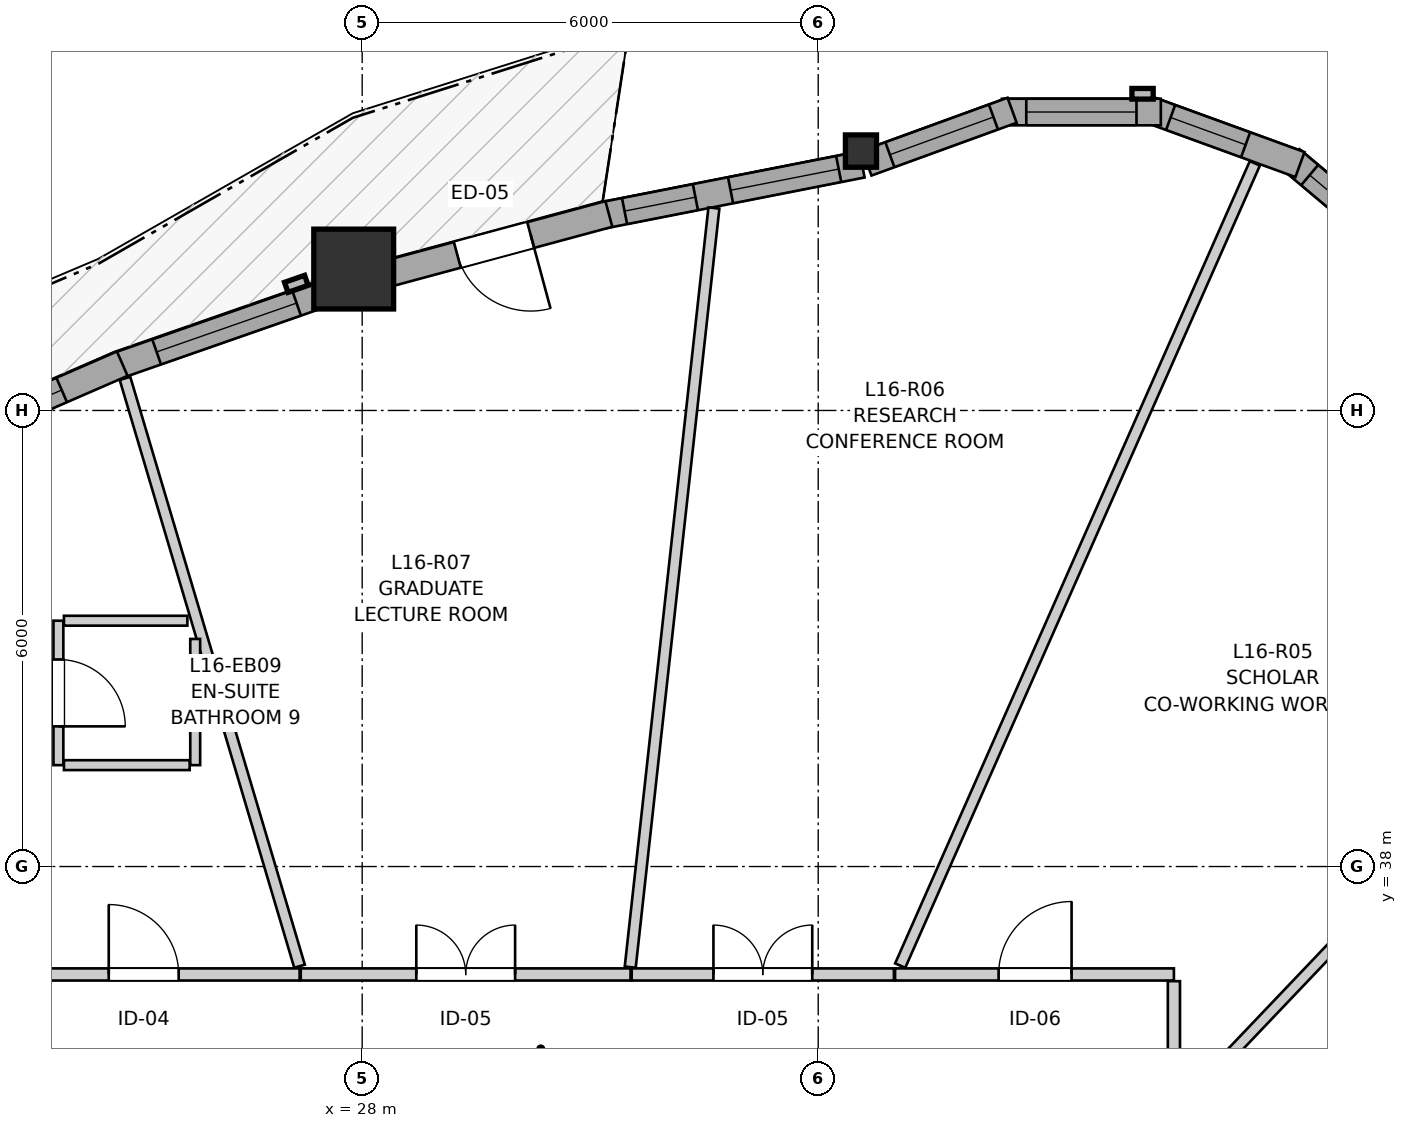
"""IFC4 building model, lengths in metres.
Left out: names, types, materials, properties, quantities, classifications, styles, units other than length and angle.
Written with IfcOpenShell. Run it as: python <this file> out.ifc"""

import sys

from ifc_helpers import new_model, si_unit, direction, frame, frame_2d, origin, origin_2d, place, context, subcontext, project, spatial, rectangle, i_section, extrude, source, transform, mapped, element, fill, save


model = new_model("IFC4")
c1 = context("Model", 3, precision=1e-05, world=origin(), true_north=direction((0.0, 1.0)))
c2 = subcontext(c1, "Body", "Model", "MODEL_VIEW")
j1 = project(units=[si_unit("LENGTHUNIT", "METRE"), si_unit("PLANEANGLEUNIT", "RADIAN")], contexts=[c1])
p1 = place(None, origin())
s1 = spatial("IfcSite", under=j1, at=p1, CompositionType="ELEMENT")
p2 = place(p1, origin())
s2 = spatial("IfcBuilding", under=s1, at=p2, CompositionType="ELEMENT")
p3 = place(p2, frame((0.0, 0.0, 55.8)))
s3 = spatial("IfcBuildingStorey", under=s2, at=p3, CompositionType="ELEMENT", Elevation=55.8)
m1 = source(origin(), c2, "Body", "SweptSolid", [
    extrude(i_section(OverallWidth=0.409, OverallDepth=0.425, WebThickness=0.03, FlangeThickness=0.048, FilletRadius=0.015, at=origin_2d()), origin(), (0.0, 0.0, 1.0), 2.94),
])
p4 = place(p3, frame((34.562, 47.413, 0.0), z_axis=(0.0, 0.0, 1.0), x_axis=(1.0, 0.0, 0.0)))
e1 = element("IfcColumn", 1, at=p4, inside=s3, PredefinedType="PILASTER", context=c2, shape_type="MappedRepresentation", body=[
    mapped(m1, transform((0.0, 0.0, 0.0), x_axis=(1.0, 0.0, 0.0), y_axis=(0.0, 1.0, 0.0), z_axis=(0.0, 0.0, 1.0), scale=1.0)),
])
m2 = source(origin(), c2, "Body", "SweptSolid", [
    extrude(rectangle(XDim=1.05, YDim=1.05, at=origin_2d()), origin(), (0.0, 0.0, 1.0), 2.94),
])
p5 = place(p3, frame((27.888, 45.861, 0.0), z_axis=(0.0, 0.0, 1.0), x_axis=(1.0, 0.0, 0.0)))
e2 = element("IfcColumn", 2, at=p5, inside=s3, PredefinedType="COLUMN", context=c2, shape_type="MappedRepresentation", body=[
    mapped(m2, transform((0.0, 0.0, 0.0), x_axis=(1.0, 0.0, 0.0), y_axis=(0.0, 1.0, 0.0), z_axis=(0.0, 0.0, 1.0), scale=1.0)),
])
p6 = place(p3, frame((41.822, 45.959, 0.0), z_axis=(0.0, 0.0, 1.0), x_axis=(-0.766024572719, 0.642811289563, 0.0)))
e3 = element("IfcWall", 3, at=p6, inside=s3, PredefinedType="SOLIDWALL", context=c2, shape_type="SweptSolid", body=[
    extrude(rectangle(XDim=2.09, YDim=0.35, at=frame_2d((1.045, 0.0))), origin(), (0.0, 0.0, 1.0), 2.42),
])
p7 = place(p6, frame((0.32, 0.0, 0.82)))
e4 = element("IfcOpeningElement", 4, at=p7, cuts=e3, PredefinedType="OPENING", context=c2, shape_type="SweptSolid", body=[
    extrude(rectangle(XDim=1.45, YDim=1.25, at=frame_2d((0.725, 0.625))), frame((0.0, 0.185, 0.0), z_axis=(0.0, -1.0, 0.0), x_axis=(1.0, 0.0, 0.0)), (0.0, 0.0, 1.0), 0.37),
])
p8 = place(p3, frame((40.338, 47.235, 0.0), z_axis=(0.0, 0.0, 1.0), x_axis=(-0.939711556618, 0.341968113072, 0.0)))
e5 = element("IfcWall", 5, at=p8, inside=s3, PredefinedType="SOLIDWALL", context=c2, shape_type="SweptSolid", body=[
    extrude(rectangle(XDim=2.09, YDim=0.35, at=frame_2d((1.045, 0.0))), origin(), (0.0, 0.0, 1.0), 2.42),
])
p9 = place(p8, frame((0.761, 0.0, 0.82)))
e6 = element("IfcOpeningElement", 6, at=p9, cuts=e5, PredefinedType="OPENING", context=c2, shape_type="SweptSolid", body=[
    extrude(rectangle(XDim=1.05, YDim=1.45, at=frame_2d((0.525, 0.725))), frame((0.0, 0.185, 0.0), z_axis=(0.0, -1.0, 0.0), x_axis=(1.0, 0.0, 0.0)), (0.0, 0.0, 1.0), 0.37),
])
p10 = place(p3, frame((38.508, 47.927, 0.0), z_axis=(0.0, 0.0, 1.0), x_axis=(-1.0, 0.0, 0.0)))
e7 = element("IfcWall", 7, at=p10, inside=s3, PredefinedType="SOLIDWALL", context=c2, shape_type="SweptSolid", body=[
    extrude(rectangle(XDim=2.091, YDim=0.35, at=frame_2d((1.045, 0.0))), origin(), (0.0, 0.0, 1.0), 2.42),
])
p11 = place(p10, frame((0.32, 0.0, 0.82)))
e8 = element("IfcOpeningElement", 8, at=p11, cuts=e7, PredefinedType="OPENING", context=c2, shape_type="SweptSolid", body=[
    extrude(rectangle(XDim=1.45, YDim=1.25, at=frame_2d((0.725, 0.625))), frame((0.0, 0.185, 0.0), z_axis=(0.0, -1.0, 0.0), x_axis=(1.0, 0.0, 0.0)), (0.0, 0.0, 1.0), 0.37),
])
p12 = place(p3, frame((36.551, 47.95, 0.0), z_axis=(0.0, 0.0, 1.0), x_axis=(-0.939691662178, -0.342022777067, 0.0)))
e9 = element("IfcWall", 9, at=p12, inside=s3, PredefinedType="SOLIDWALL", context=c2, shape_type="SweptSolid", body=[
    extrude(rectangle(XDim=2.032, YDim=0.35, at=frame_2d((1.016, 0.0))), origin(), (0.0, 0.0, 1.0), 2.42),
])
p13 = place(p12, frame((0.261, 0.0, 0.82)))
e10 = element("IfcOpeningElement", 10, at=p13, cuts=e9, PredefinedType="OPENING", context=c2, shape_type="SweptSolid", body=[
    extrude(rectangle(XDim=1.45, YDim=1.25, at=frame_2d((0.725, 0.625))), frame((0.0, 0.185, 0.0), z_axis=(0.0, -1.0, 0.0), x_axis=(1.0, 0.0, 0.0)), (0.0, 0.0, 1.0), 0.37),
])
p14 = place(p3, frame((34.577, 47.237, 0.0), z_axis=(0.0, 0.0, 1.0), x_axis=(-0.981238400755, -0.192798342532, 0.0)))
e11 = element("IfcWall", 11, at=p14, inside=s3, PredefinedType="SOLIDWALL", context=c2, shape_type="SweptSolid", body=[
    extrude(rectangle(XDim=3.482, YDim=0.35, at=frame_2d((1.741, 0.0))), origin(), (0.0, 0.0, 1.0), 2.42),
])
p15 = place(p14, frame((0.313, 0.0, 0.82)))
e12 = element("IfcOpeningElement", 12, at=p15, cuts=e11, PredefinedType="OPENING", context=c2, shape_type="SweptSolid", body=[
    extrude(rectangle(XDim=1.45, YDim=1.25, at=frame_2d((0.725, 0.625))), frame((0.0, 0.185, 0.0), z_axis=(0.0, -1.0, 0.0), x_axis=(1.0, 0.0, 0.0)), (0.0, 0.0, 1.0), 0.37),
])
p16 = place(p14, frame((2.234, 0.0, 0.82)))
e13 = element("IfcOpeningElement", 13, at=p16, cuts=e11, PredefinedType="OPENING", context=c2, shape_type="SweptSolid", body=[
    extrude(rectangle(XDim=0.95, YDim=1.35, at=frame_2d((0.475, 0.675))), frame((0.0, 0.185, 0.0), z_axis=(0.0, -1.0, 0.0), x_axis=(1.0, 0.0, 0.0)), (0.0, 0.0, 1.0), 0.37),
])
p17 = place(p3, frame((31.246, 46.585, 0.0), z_axis=(0.0, 0.0, 1.0), x_axis=(-0.965469506164, -0.260516089076, 0.0)))
e14 = element("IfcWall", 14, at=p17, inside=s3, PredefinedType="SOLIDWALL", context=c2, shape_type="SweptSolid", body=[
    extrude(rectangle(XDim=3.13, YDim=0.35, at=frame_2d((1.565, 0.0))), origin(), (0.0, 0.0, 1.0), 2.42),
])
p18 = place(p17, frame((1.065, 0.0, 0.0)))
e15 = element("IfcOpeningElement", 15, at=p18, cuts=e14, PredefinedType="OPENING", context=c2, shape_type="SweptSolid", body=[
    extrude(rectangle(XDim=1.0, YDim=2.1, at=frame_2d((0.5, 1.05))), frame((0.0, 0.185, 0.0), z_axis=(0.0, -1.0, 0.0), x_axis=(1.0, 0.0, 0.0)), (0.0, 0.0, 1.0), 0.37),
])
p19 = place(p3, frame((27.663, 45.596, 0.0), z_axis=(0.0, 0.0, 1.0), x_axis=(-0.944134113087, -0.329561491236, 0.0)))
e16 = element("IfcWall", 16, at=p19, inside=s3, PredefinedType="SOLIDWALL", context=c2, shape_type="SweptSolid", body=[
    extrude(rectangle(XDim=3.074, YDim=0.35, at=frame_2d((1.537, 0.0))), origin(), (0.0, 0.0, 1.0), 2.42),
])
p20 = place(p19, frame((0.557, 0.0, 0.82)))
e17 = element("IfcOpeningElement", 17, at=p20, cuts=e16, PredefinedType="OPENING", context=c2, shape_type="SweptSolid", body=[
    extrude(rectangle(XDim=1.95, YDim=1.4, at=frame_2d((0.975, 0.7))), frame((0.0, 0.185, 0.0), z_axis=(0.0, -1.0, 0.0), x_axis=(1.0, 0.0, 0.0)), (0.0, 0.0, 1.0), 0.37),
])
p21 = place(p3, frame((24.843, 44.615, 0.0), z_axis=(0.0, 0.0, 1.0), x_axis=(-0.917119193404, -0.398613076918, 0.0)))
e18 = element("IfcWall", 18, at=p21, inside=s3, PredefinedType="SOLIDWALL", context=c2, shape_type="SweptSolid", body=[
    extrude(rectangle(XDim=3.317, YDim=0.35, at=frame_2d((1.659, 0.0))), origin(), (0.0, 0.0, 1.0), 2.42),
])
p22 = place(p21, frame((0.869, 0.0, 0.82)))
e19 = element("IfcOpeningElement", 19, at=p22, cuts=e18, PredefinedType="OPENING", context=c2, shape_type="SweptSolid", body=[
    extrude(rectangle(XDim=1.6, YDim=1.35, at=frame_2d((0.8, 0.675))), frame((0.0, 0.185, 0.0), z_axis=(0.0, -1.0, 0.0), x_axis=(1.0, 0.0, 0.0)), (0.0, 0.0, 1.0), 0.37),
])
p23 = place(p3, frame((27.192, 36.58, 0.0), z_axis=(0.0, 0.0, 1.0), x_axis=(1.0, 0.0, 0.0)))
e20 = element("IfcWall", 20, at=p23, inside=s3, PredefinedType="PARTITIONING", context=c2, shape_type="SweptSolid", body=[
    extrude(rectangle(XDim=4.339, YDim=0.16, at=frame_2d((2.169, 0.0))), origin(), (0.0, 0.0, 1.0), 2.94),
])
p24 = place(p23, frame((1.52, 0.0, 0.0)))
e21 = element("IfcOpeningElement", 21, at=p24, cuts=e20, PredefinedType="OPENING", context=c2, shape_type="SweptSolid", body=[
    extrude(rectangle(XDim=1.3, YDim=2.1, at=frame_2d((0.65, 1.05))), frame((0.0, 0.09, 0.0), z_axis=(0.0, -1.0, 0.0), x_axis=(1.0, 0.0, 0.0)), (0.0, 0.0, 1.0), 0.18),
])
p25 = place(p3, frame((23.025, 36.58, 0.0), z_axis=(0.0, 0.0, 1.0), x_axis=(1.0, 0.0, 0.0)))
e22 = element("IfcWall", 22, at=p25, inside=s3, PredefinedType="PARTITIONING", context=c2, shape_type="SweptSolid", body=[
    extrude(rectangle(XDim=4.152, YDim=0.16, at=frame_2d((2.076, 0.0))), origin(), (0.0, 0.0, 1.0), 2.548),
])
p26 = place(p25, frame((1.64, 0.0, 0.0)))
e23 = element("IfcOpeningElement", 23, at=p26, cuts=e22, PredefinedType="OPENING", context=c2, shape_type="SweptSolid", body=[
    extrude(rectangle(XDim=0.92, YDim=2.1, at=frame_2d((0.46, 1.05))), frame((0.0, 0.09, 0.0), z_axis=(0.0, -1.0, 0.0), x_axis=(1.0, 0.0, 0.0)), (0.0, 0.0, 1.0), 0.18),
])
p27 = place(p3, frame((35.011, 36.58, 0.0), z_axis=(0.0, 0.0, 1.0), x_axis=(1.0, 0.0, 0.0)))
e24 = element("IfcWall", 24, at=p27, inside=s3, PredefinedType="PARTITIONING", context=c2, shape_type="SweptSolid", body=[
    extrude(rectangle(XDim=3.669, YDim=0.16, at=frame_2d((1.834, 0.0))), origin(), (0.0, 0.0, 1.0), 2.94),
])
p28 = place(p27, frame((1.363, 0.0, 0.0)))
e25 = element("IfcOpeningElement", 25, at=p28, cuts=e24, PredefinedType="OPENING", context=c2, shape_type="SweptSolid", body=[
    extrude(rectangle(XDim=0.96, YDim=2.1, at=frame_2d((0.48, 1.05))), frame((0.0, 0.09, 0.0), z_axis=(0.0, -1.0, 0.0), x_axis=(1.0, 0.0, 0.0)), (0.0, 0.0, 1.0), 0.18),
])
p29 = place(p3, frame((31.546, 36.58, 0.0), z_axis=(0.0, 0.0, 1.0), x_axis=(1.0, 0.0, 0.0)))
e26 = element("IfcWall", 26, at=p29, inside=s3, PredefinedType="PARTITIONING", context=c2, shape_type="SweptSolid", body=[
    extrude(rectangle(XDim=3.45, YDim=0.16, at=frame_2d((1.725, 0.0))), origin(), (0.0, 0.0, 1.0), 2.94),
])
p30 = place(p29, frame((1.075, 0.0, 0.0)))
e27 = element("IfcOpeningElement", 27, at=p30, cuts=e26, PredefinedType="OPENING", context=c2, shape_type="SweptSolid", body=[
    extrude(rectangle(XDim=1.3, YDim=2.1, at=frame_2d((0.65, 1.05))), frame((0.0, 0.09, 0.0), z_axis=(0.0, -1.0, 0.0), x_axis=(1.0, 0.0, 0.0)), (0.0, 0.0, 1.0), 0.18),
])
p31 = place(p3, frame((24.003, 41.234, 0.0), z_axis=(0.0, 0.0, 1.0), x_axis=(0.0, -1.0, 0.0)))
e28 = element("IfcWall", 28, at=p31, inside=s3, PredefinedType="PARTITIONING", context=c2, shape_type="SweptSolid", body=[
    extrude(rectangle(XDim=1.9, YDim=0.13, at=frame_2d((0.95, 0.0))), origin(), (0.0, 0.0, 1.0), 2.94),
])
p32 = place(p31, frame((0.51, 0.0, 0.0)))
e29 = element("IfcOpeningElement", 29, at=p32, cuts=e28, PredefinedType="OPENING", context=c2, shape_type="SweptSolid", body=[
    extrude(rectangle(XDim=0.88, YDim=2.05, at=frame_2d((0.44, 1.025))), frame((0.0, 0.075, 0.0), z_axis=(0.0, -1.0, 0.0), x_axis=(1.0, 0.0, 0.0)), (0.0, 0.0, 1.0), 0.15),
])
p33 = place(p3, frame((35.079, 36.697, 0.0), z_axis=(0.0, 0.0, 1.0), x_axis=(0.404349483928, 0.914604556542, 0.0)))
e30 = element("IfcWall", 30, at=p33, inside=s3, PredefinedType="PARTITIONING", context=c2, shape_type="SweptSolid", body=[
    extrude(rectangle(XDim=11.54, YDim=0.145, at=frame_2d((5.77, 0.0))), origin(), (0.0, 0.0, 1.0), 2.94),
])
p34 = place(p3, frame((31.527, 36.676, 0.0), z_axis=(0.0, 0.0, 1.0), x_axis=(0.109575491405, 0.993978476469, 0.0)))
e31 = element("IfcWall", 31, at=p34, inside=s3, PredefinedType="PARTITIONING", context=c2, shape_type="SweptSolid", body=[
    extrude(rectangle(XDim=10.049, YDim=0.145, at=frame_2d((5.024, 0.0))), origin(), (0.0, 0.0, 1.0), 2.94),
])
p35 = place(p3, frame((24.879, 44.422, 0.0), z_axis=(0.0, 0.0, 1.0), x_axis=(0.284634354208, -0.958636158511, 0.0)))
e32 = element("IfcWall", 32, at=p35, inside=s3, PredefinedType="PARTITIONING", context=c2, shape_type="SweptSolid", body=[
    extrude(rectangle(XDim=8.068, YDim=0.145, at=frame_2d((4.034, 0.0))), origin(), (0.0, 0.0, 1.0), 2.94),
])
p36 = place(p3, frame((38.818, 34.893, 0.0), z_axis=(0.0, 0.0, 1.0), x_axis=(0.68961378572, 0.724177344678, 0.0)))
e33 = element("IfcWall", 33, at=p36, inside=s3, PredefinedType="PARTITIONING", context=c2, shape_type="SweptSolid", body=[
    extrude(rectangle(XDim=7.071, YDim=0.145, at=frame_2d((3.535, 0.0))), origin(), (0.0, 0.0, 1.0), 2.94),
])
p37 = place(p3, frame((25.803, 39.334, 0.0), z_axis=(0.0, 0.0, 1.0), x_axis=(0.0, 1.0, 0.0)))
e34 = element("IfcWall", 34, at=p37, inside=s3, PredefinedType="PARTITIONING", context=c2, shape_type="SweptSolid", body=[
    extrude(rectangle(XDim=1.66, YDim=0.13, at=frame_2d((0.83, 0.0))), origin(), (0.0, 0.0, 1.0), 2.94),
])
p38 = place(p3, frame((24.076, 41.234, 0.0), z_axis=(0.0, 0.0, 1.0), x_axis=(1.0, 0.0, 0.0)))
e35 = element("IfcWall", 35, at=p38, inside=s3, PredefinedType="PARTITIONING", context=c2, shape_type="SweptSolid", body=[
    extrude(rectangle(XDim=1.624, YDim=0.13, at=frame_2d((0.812, 0.0))), origin(), (0.0, 0.0, 1.0), 2.94),
])
p39 = place(p3, frame((24.076, 39.334, 0.0), z_axis=(0.0, 0.0, 1.0), x_axis=(1.0, 0.0, 0.0)))
e36 = element("IfcWall", 36, at=p39, inside=s3, PredefinedType="PARTITIONING", context=c2, shape_type="SweptSolid", body=[
    extrude(rectangle(XDim=1.654, YDim=0.13, at=frame_2d((0.827, 0.0))), origin(), (0.0, 0.0, 1.0), 2.94),
])
p40 = place(p3, frame((38.68, 34.981, 0.0), z_axis=(0.0, 0.0, 1.0), x_axis=(0.0, 1.0, 0.0)))
e37 = element("IfcWall", 37, at=p40, inside=s3, PredefinedType="PARTITIONING", context=c2, shape_type="SweptSolid", body=[
    extrude(rectangle(XDim=1.511, YDim=0.16, at=frame_2d((0.755, 0.0))), origin(), (0.0, 0.0, 1.0), 2.94),
])
m3 = source(origin(), c2, "Body", "SweptSolid", [
    extrude(rectangle(XDim=1.45, YDim=1.25, at=frame_2d((0.725, 0.625))), frame((0.0, 0.03, 0.0), z_axis=(0.0, -1.0, 0.0), x_axis=(1.0, 0.0, 0.0)), (0.0, 0.0, 1.0), 0.06),
])
p41 = place(p7, origin())
e38 = element("IfcWindow", 38, at=p41, inside=s3, PartitioningType="SINGLE_PANEL", PredefinedType="WINDOW", context=c2, shape_type="MappedRepresentation", body=[
    mapped(m3, transform((0.0, 0.0, 0.0), x_axis=(1.0, 0.0, 0.0), y_axis=(0.0, 1.0, 0.0), z_axis=(0.0, 0.0, 1.0), scale=1.0)),
])
fill(e4, e38)
m4 = source(origin(), c2, "Body", "SweptSolid", [
    extrude(rectangle(XDim=1.05, YDim=1.45, at=frame_2d((0.525, 0.725))), frame((0.0, 0.03, 0.0), z_axis=(0.0, -1.0, 0.0), x_axis=(1.0, 0.0, 0.0)), (0.0, 0.0, 1.0), 0.06),
])
p42 = place(p9, origin())
e39 = element("IfcWindow", 39, at=p42, inside=s3, PartitioningType="SINGLE_PANEL", PredefinedType="WINDOW", context=c2, shape_type="MappedRepresentation", body=[
    mapped(m4, transform((0.0, 0.0, 0.0), x_axis=(1.0, 0.0, 0.0), y_axis=(0.0, 1.0, 0.0), z_axis=(0.0, 0.0, 1.0), scale=1.0)),
])
fill(e6, e39)
p43 = place(p11, origin())
e40 = element("IfcWindow", 40, at=p43, inside=s3, PartitioningType="SINGLE_PANEL", PredefinedType="WINDOW", context=c2, shape_type="MappedRepresentation", body=[
    mapped(m3, transform((0.0, 0.0, 0.0), x_axis=(1.0, 0.0, 0.0), y_axis=(0.0, 1.0, 0.0), z_axis=(0.0, 0.0, 1.0), scale=1.0)),
])
fill(e8, e40)
p44 = place(p13, origin())
e41 = element("IfcWindow", 41, at=p44, inside=s3, PartitioningType="SINGLE_PANEL", PredefinedType="WINDOW", context=c2, shape_type="MappedRepresentation", body=[
    mapped(m3, transform((0.0, 0.0, 0.0), x_axis=(1.0, 0.0, 0.0), y_axis=(0.0, 1.0, 0.0), z_axis=(0.0, 0.0, 1.0), scale=1.0)),
])
fill(e10, e41)
p45 = place(p15, origin())
e42 = element("IfcWindow", 42, at=p45, inside=s3, PartitioningType="SINGLE_PANEL", PredefinedType="WINDOW", context=c2, shape_type="MappedRepresentation", body=[
    mapped(m3, transform((0.0, 0.0, 0.0), x_axis=(1.0, 0.0, 0.0), y_axis=(0.0, 1.0, 0.0), z_axis=(0.0, 0.0, 1.0), scale=1.0)),
])
fill(e12, e42)
m5 = source(origin(), c2, "Body", "SweptSolid", [
    extrude(rectangle(XDim=0.95, YDim=1.35, at=frame_2d((0.475, 0.675))), frame((0.0, 0.03, 0.0), z_axis=(0.0, -1.0, 0.0), x_axis=(1.0, 0.0, 0.0)), (0.0, 0.0, 1.0), 0.06),
])
p46 = place(p16, origin())
e43 = element("IfcWindow", 43, at=p46, inside=s3, PartitioningType="SINGLE_PANEL", PredefinedType="WINDOW", context=c2, shape_type="MappedRepresentation", body=[
    mapped(m5, transform((0.0, 0.0, 0.0), x_axis=(1.0, 0.0, 0.0), y_axis=(0.0, 1.0, 0.0), z_axis=(0.0, 0.0, 1.0), scale=1.0)),
])
fill(e13, e43)
m6 = source(origin(), c2, "Body", "SweptSolid", [
    extrude(rectangle(XDim=1.95, YDim=1.4, at=frame_2d((0.975, 0.7))), frame((0.0, 0.03, 0.0), z_axis=(0.0, -1.0, 0.0), x_axis=(1.0, 0.0, 0.0)), (0.0, 0.0, 1.0), 0.06),
])
p47 = place(p20, origin())
e44 = element("IfcWindow", 44, at=p47, inside=s3, PartitioningType="SINGLE_PANEL", PredefinedType="WINDOW", context=c2, shape_type="MappedRepresentation", body=[
    mapped(m6, transform((0.0, 0.0, 0.0), x_axis=(1.0, 0.0, 0.0), y_axis=(0.0, 1.0, 0.0), z_axis=(0.0, 0.0, 1.0), scale=1.0)),
])
fill(e17, e44)
m7 = source(origin(), c2, "Body", "SweptSolid", [
    extrude(rectangle(XDim=1.6, YDim=1.35, at=frame_2d((0.8, 0.675))), frame((0.0, 0.03, 0.0), z_axis=(0.0, -1.0, 0.0), x_axis=(1.0, 0.0, 0.0)), (0.0, 0.0, 1.0), 0.06),
])
p48 = place(p22, origin())
e45 = element("IfcWindow", 45, at=p48, inside=s3, PartitioningType="SINGLE_PANEL", PredefinedType="WINDOW", context=c2, shape_type="MappedRepresentation", body=[
    mapped(m7, transform((0.0, 0.0, 0.0), x_axis=(1.0, 0.0, 0.0), y_axis=(0.0, 1.0, 0.0), z_axis=(0.0, 0.0, 1.0), scale=1.0)),
])
fill(e19, e45)
m8 = source(origin(), c2, "Body", "SweptSolid", [
    extrude(rectangle(XDim=1.0, YDim=2.1, at=frame_2d((0.5, 1.05))), frame((0.0, 0.025, 0.0), z_axis=(0.0, -1.0, 0.0), x_axis=(1.0, 0.0, 0.0)), (0.0, 0.0, 1.0), 0.05),
])
p49 = place(p18, origin())
e46 = element("IfcDoor", 46, at=p49, inside=s3, OperationType="SINGLE_SWING_LEFT", PredefinedType="DOOR", context=c2, shape_type="MappedRepresentation", body=[
    mapped(m8, transform((0.0, 0.0, 0.0), x_axis=(1.0, 0.0, 0.0), y_axis=(0.0, 1.0, 0.0), z_axis=(0.0, 0.0, 1.0), scale=1.0)),
])
fill(e15, e46)
m9 = source(origin(), c2, "Body", "SweptSolid", [
    extrude(rectangle(XDim=1.3, YDim=2.1, at=frame_2d((0.65, 1.05))), frame((0.0, 0.025, 0.0), z_axis=(0.0, -1.0, 0.0), x_axis=(1.0, 0.0, 0.0)), (0.0, 0.0, 1.0), 0.05),
])
p50 = place(p24, origin())
e47 = element("IfcDoor", 47, at=p50, inside=s3, OperationType="DOUBLE_DOOR_SINGLE_SWING", PredefinedType="DOOR", context=c2, shape_type="MappedRepresentation", body=[
    mapped(m9, transform((0.0, 0.0, 0.0), x_axis=(1.0, 0.0, 0.0), y_axis=(0.0, 1.0, 0.0), z_axis=(0.0, 0.0, 1.0), scale=1.0)),
])
fill(e21, e47)
m10 = source(origin(), c2, "Body", "SweptSolid", [
    extrude(rectangle(XDim=0.92, YDim=2.1, at=frame_2d((0.46, 1.05))), frame((0.0, 0.025, 0.0), z_axis=(0.0, -1.0, 0.0), x_axis=(1.0, 0.0, 0.0)), (0.0, 0.0, 1.0), 0.05),
])
p51 = place(p26, origin())
e48 = element("IfcDoor", 48, at=p51, inside=s3, OperationType="SINGLE_SWING_LEFT", PredefinedType="DOOR", context=c2, shape_type="MappedRepresentation", body=[
    mapped(m10, transform((0.0, 0.0, 0.0), x_axis=(1.0, 0.0, 0.0), y_axis=(0.0, 1.0, 0.0), z_axis=(0.0, 0.0, 1.0), scale=1.0)),
])
fill(e23, e48)
m11 = source(origin(), c2, "Body", "SweptSolid", [
    extrude(rectangle(XDim=0.96, YDim=2.1, at=frame_2d((0.48, 1.05))), frame((0.0, 0.025, 0.0), z_axis=(0.0, -1.0, 0.0), x_axis=(1.0, 0.0, 0.0)), (0.0, 0.0, 1.0), 0.05),
])
p52 = place(p28, origin())
e49 = element("IfcDoor", 49, at=p52, inside=s3, OperationType="SINGLE_SWING_RIGHT", PredefinedType="DOOR", context=c2, shape_type="MappedRepresentation", body=[
    mapped(m11, transform((0.0, 0.0, 0.0), x_axis=(1.0, 0.0, 0.0), y_axis=(0.0, 1.0, 0.0), z_axis=(0.0, 0.0, 1.0), scale=1.0)),
])
fill(e25, e49)
p53 = place(p30, origin())
e50 = element("IfcDoor", 50, at=p53, inside=s3, OperationType="DOUBLE_DOOR_SINGLE_SWING", PredefinedType="DOOR", context=c2, shape_type="MappedRepresentation", body=[
    mapped(m9, transform((0.0, 0.0, 0.0), x_axis=(1.0, 0.0, 0.0), y_axis=(0.0, 1.0, 0.0), z_axis=(0.0, 0.0, 1.0), scale=1.0)),
])
fill(e27, e50)
m12 = source(origin(), c2, "Body", "SweptSolid", [
    extrude(rectangle(XDim=0.88, YDim=2.05, at=frame_2d((0.44, 1.025))), frame((0.0, 0.025, 0.0), z_axis=(0.0, -1.0, 0.0), x_axis=(1.0, 0.0, 0.0)), (0.0, 0.0, 1.0), 0.05),
])
p54 = place(p32, origin())
e51 = element("IfcDoor", 51, at=p54, inside=s3, OperationType="SINGLE_SWING_RIGHT", PredefinedType="DOOR", context=c2, shape_type="MappedRepresentation", body=[
    mapped(m12, transform((0.0, 0.0, 0.0), x_axis=(1.0, 0.0, 0.0), y_axis=(0.0, 1.0, 0.0), z_axis=(0.0, 0.0, 1.0), scale=1.0)),
])
fill(e29, e51)
save(model, sys.argv[1])
